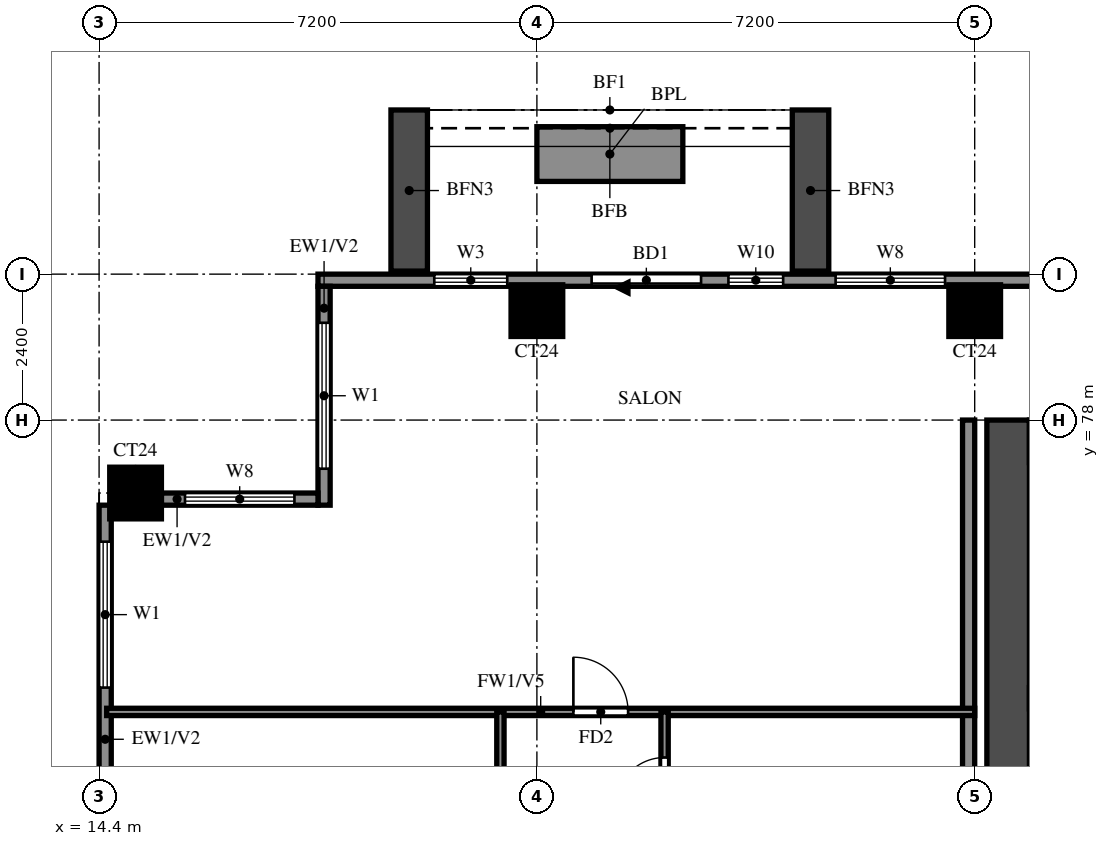
"""IFC4 building model, lengths in metres.
Left out: names, types, materials, properties, quantities, classifications, styles, units other than length and angle.
Written with IfcOpenShell. Run it as: python <this file> out.ifc"""

import sys

from ifc_helpers import new_model, si_unit, direction, frame, frame_2d, origin, origin_2d, place, context, subcontext, project, spatial, rectangle, extrude, source, transform, mapped, element, fill, save


model = new_model("IFC4")
c1 = context("Model", 3, precision=1e-05, world=origin(), true_north=direction((0.0, 1.0)))
c2 = subcontext(c1, "Body", "Model", "MODEL_VIEW")
j1 = project(units=[si_unit("LENGTHUNIT", "METRE"), si_unit("PLANEANGLEUNIT", "RADIAN")], contexts=[c1])
p1 = place(None, origin())
s1 = spatial("IfcSite", under=j1, at=p1, CompositionType="ELEMENT")
p2 = place(p1, origin())
s2 = spatial("IfcBuilding", under=s1, at=p2, CompositionType="ELEMENT")
p3 = place(p2, frame((0.0, 0.0, 153.5)))
s3 = spatial("IfcBuildingStorey", under=s2, at=p3, CompositionType="ELEMENT", Elevation=153.5)
m1 = source(origin(), c2, "Body", "SweptSolid", [
    extrude(rectangle(XDim=0.85, YDim=0.85, at=origin_2d()), origin(), (0.0, 0.0, 1.0), 3.2),
])
for number, where, z_axis, x_axis in (
    (1, (15.0, 76.8, 0.0), (0.0, 0.0, 1.0), (1.0, 0.0, 0.0)),
    (2, (21.6, 79.8, 0.0), (0.0, 0.0, 1.0), (1.0, 0.0, 0.0)),
    (3, (28.8, 79.8, 0.0), (0.0, 0.0, 1.0), (1.0, 0.0, 0.0)),
):
    element("IfcColumn", number, at=place(p3, frame(where, z_axis=z_axis, x_axis=x_axis)), inside=s3, PredefinedType="COLUMN", context=c2, shape_type="MappedRepresentation", body=[
        mapped(m1, transform((0.0, 0.0, 0.0))),
    ])
p4 = place(p3, frame((29.35, 66.1, 0.0), z_axis=(0.0, 0.0, 1.0), x_axis=(0.0, 1.0, 0.0)))
e4 = element("IfcWall", 4, at=p4, inside=s3, PredefinedType="SHEAR", context=c2, shape_type="SweptSolid", body=[
    extrude(rectangle(XDim=11.9, YDim=0.7, at=frame_2d((5.95, 0.0))), origin(), (0.0, 0.0, 1.0), 3.2),
])
p5 = place(p3, frame((82.6, 80.3, 0.0), z_axis=(0.0, 0.0, 1.0), x_axis=(-1.0, 0.0, 0.0)))
e5 = element("IfcWall", 5, at=p5, inside=s3, PredefinedType="SOLIDWALL", context=c2, shape_type="SweptSolid", body=[
    extrude(rectangle(XDim=64.6, YDim=0.2, at=frame_2d((32.3, 0.0))), origin(), (0.0, 0.0, 1.0), 3.2),
])
p6 = place(p5, frame((58.3, 0.0, 0.0)))
e6 = element("IfcOpeningElement", 6, at=p6, cuts=e5, PredefinedType="OPENING", context=c2, shape_type="SweptSolid", body=[
    extrude(rectangle(XDim=1.8, YDim=2.4, at=frame_2d((0.9, 1.2))), frame((0.0, 0.11, 0.0), z_axis=(0.0, -1.0, 0.0), x_axis=(1.0, 0.0, 0.0)), (0.0, 0.0, 1.0), 0.22),
])
p7 = place(p5, frame((54.288, 0.0, 0.6)))
e7 = element("IfcOpeningElement", 7, at=p7, cuts=e5, PredefinedType="OPENING", context=c2, shape_type="SweptSolid", body=[
    extrude(rectangle(XDim=1.8, YDim=2.4, at=frame_2d((0.9, 1.2))), frame((0.0, 0.11, 0.0), z_axis=(0.0, -1.0, 0.0), x_axis=(1.0, 0.0, 0.0)), (0.0, 0.0, 1.0), 0.22),
])
p8 = place(p5, frame((56.95, 0.0, 0.6)))
e8 = element("IfcOpeningElement", 8, at=p8, cuts=e5, PredefinedType="OPENING", context=c2, shape_type="SweptSolid", body=[
    extrude(rectangle(XDim=0.9, YDim=2.4, at=frame_2d((0.45, 1.2))), frame((0.0, 0.11, 0.0), z_axis=(0.0, -1.0, 0.0), x_axis=(1.0, 0.0, 0.0)), (0.0, 0.0, 1.0), 0.22),
])
p9 = place(p5, frame((61.488, 0.0, 0.6)))
e9 = element("IfcOpeningElement", 9, at=p9, cuts=e5, PredefinedType="OPENING", context=c2, shape_type="SweptSolid", body=[
    extrude(rectangle(XDim=1.2, YDim=2.4, at=frame_2d((0.6, 1.2))), frame((0.0, 0.11, 0.0), z_axis=(0.0, -1.0, 0.0), x_axis=(1.0, 0.0, 0.0)), (0.0, 0.0, 1.0), 0.22),
])
p10 = place(p5, frame((0.712, 0.0, 0.6)))
e10 = element("IfcOpeningElement", 10, at=p10, cuts=e5, PredefinedType="OPENING", context=c2, shape_type="SweptSolid", body=[
    extrude(rectangle(XDim=1.8, YDim=2.4, at=frame_2d((0.9, 1.2))), frame((0.0, 0.11, 0.0), z_axis=(0.0, -1.0, 0.0), x_axis=(1.0, 0.0, 0.0)), (0.0, 0.0, 1.0), 0.22),
])
p11 = place(p5, frame((4.358, 0.0, 0.6)))
e11 = element("IfcOpeningElement", 11, at=p11, cuts=e5, PredefinedType="OPENING", context=c2, shape_type="SweptSolid", body=[
    extrude(rectangle(XDim=2.4, YDim=2.4, at=frame_2d((1.2, 1.2))), frame((0.0, 0.11, 0.0), z_axis=(0.0, -1.0, 0.0), x_axis=(1.0, 0.0, 0.0)), (0.0, 0.0, 1.0), 0.22),
])
p12 = place(p5, frame((7.242, 0.0, 0.6)))
e12 = element("IfcOpeningElement", 12, at=p12, cuts=e5, PredefinedType="OPENING", context=c2, shape_type="SweptSolid", body=[
    extrude(rectangle(XDim=2.4, YDim=2.4, at=frame_2d((1.2, 1.2))), frame((0.0, 0.11, 0.0), z_axis=(0.0, -1.0, 0.0), x_axis=(1.0, 0.0, 0.0)), (0.0, 0.0, 1.0), 0.22),
])
p13 = place(p3, frame((18.1, 80.2, 0.0), z_axis=(0.0, 0.0, 1.0), x_axis=(0.0, -1.0, 0.0)))
e13 = element("IfcWall", 13, at=p13, inside=s3, PredefinedType="SOLIDWALL", context=c2, shape_type="SweptSolid", body=[
    extrude(rectangle(XDim=3.6, YDim=0.2, at=frame_2d((1.8, 0.0))), origin(), (0.0, 0.0, 1.0), 3.2),
])
p14 = place(p13, frame((0.6, 0.0, 0.6)))
e14 = element("IfcOpeningElement", 14, at=p14, cuts=e13, PredefinedType="OPENING", context=c2, shape_type="SweptSolid", body=[
    extrude(rectangle(XDim=2.4, YDim=2.4, at=frame_2d((1.2, 1.2))), frame((0.0, 0.11, 0.0), z_axis=(0.0, -1.0, 0.0), x_axis=(1.0, 0.0, 0.0)), (0.0, 0.0, 1.0), 0.22),
])
p15 = place(p3, frame((18.0, 76.7, 0.0), z_axis=(0.0, 0.0, 1.0), x_axis=(-1.0, 0.0, 0.0)))
e15 = element("IfcWall", 15, at=p15, inside=s3, PredefinedType="SOLIDWALL", context=c2, shape_type="SweptSolid", body=[
    extrude(rectangle(XDim=2.575, YDim=0.2, at=frame_2d((1.288, 0.0))), origin(), (0.0, 0.0, 1.0), 3.2),
])
p16 = place(p15, frame((0.387, 0.0, 0.6)))
e16 = element("IfcOpeningElement", 16, at=p16, cuts=e15, PredefinedType="OPENING", context=c2, shape_type="SweptSolid", body=[
    extrude(rectangle(XDim=1.8, YDim=2.4, at=frame_2d((0.9, 1.2))), frame((0.0, 0.11, 0.0), z_axis=(0.0, -1.0, 0.0), x_axis=(1.0, 0.0, 0.0)), (0.0, 0.0, 1.0), 0.22),
])
p17 = place(p3, frame((14.5, 76.6, 0.0), z_axis=(0.0, 0.0, 1.0), x_axis=(0.0, -1.0, 0.0)))
e17 = element("IfcWall", 17, at=p17, inside=s3, PredefinedType="SOLIDWALL", context=c2, shape_type="SweptSolid", body=[
    extrude(rectangle(XDim=7.0, YDim=0.2, at=frame_2d((3.5, 0.0))), origin(), (0.0, 0.0, 1.0), 3.2),
])
p18 = place(p17, frame((4.562, 0.0, 1.5)))
e18 = element("IfcOpeningElement", 18, at=p18, cuts=e17, PredefinedType="OPENING", context=c2, shape_type="SweptSolid", body=[
    extrude(rectangle(XDim=0.9, YDim=0.9, at=frame_2d((0.45, 0.45))), frame((0.0, 0.11, 0.0), z_axis=(0.0, -1.0, 0.0), x_axis=(1.0, 0.0, 0.0)), (0.0, 0.0, 1.0), 0.22),
])
p19 = place(p17, frame((0.6, 0.0, 0.6)))
e19 = element("IfcOpeningElement", 19, at=p19, cuts=e17, PredefinedType="OPENING", context=c2, shape_type="SweptSolid", body=[
    extrude(rectangle(XDim=2.4, YDim=2.4, at=frame_2d((1.2, 1.2))), frame((0.0, 0.11, 0.0), z_axis=(0.0, -1.0, 0.0), x_axis=(1.0, 0.0, 0.0)), (0.0, 0.0, 1.0), 0.22),
])
for number, where, z_axis, x_axis in (
    (20, (26.1, 80.45, 0.0), (0.0, 0.0, 1.0), (0.0, 1.0, 0.0)),
    (21, (19.5, 80.45, 0.0), (0.0, 0.0, 1.0), (0.0, 1.0, 0.0)),
):
    element("IfcWall", number, at=place(p3, frame(where, z_axis=z_axis, x_axis=x_axis)), inside=s3, PredefinedType="SOLIDWALL", context=c2, shape_type="SweptSolid", body=[
        extrude(rectangle(XDim=2.65, YDim=0.6, at=frame_2d((1.325, 0.0))), origin(), (0.0, 0.0, 1.0), 2.85),
    ])
p20 = place(p3, frame((24.0, 82.375, 0.0), z_axis=(0.0, 0.0, 1.0), x_axis=(-1.0, 0.0, 0.0)))
e22 = element("IfcWall", 22, at=p20, inside=s3, PredefinedType="SOLIDWALL", context=c2, shape_type="SweptSolid", body=[
    extrude(rectangle(XDim=2.4, YDim=0.9, at=frame_2d((1.2, 0.0))), origin(), (0.0, 0.0, 1.0), 0.9),
])
p21 = place(p3, frame((28.7, 62.4, 0.0), z_axis=(0.0, 0.0, 1.0), x_axis=(0.0, 1.0, 0.0)))
e23 = element("IfcWall", 23, at=p21, inside=s3, PredefinedType="SOLIDWALL", context=c2, shape_type="SweptSolid", body=[
    extrude(rectangle(XDim=15.6, YDim=0.2, at=frame_2d((7.8, 0.0))), origin(), (0.0, 0.0, 1.0), 3.2),
])
p22 = place(p3, frame((14.525, 73.2, 0.0), z_axis=(0.0, 0.0, 1.0), x_axis=(1.0, 0.0, 0.0)))
e24 = element("IfcWall", 24, at=p22, inside=s3, PredefinedType="PARTITIONING", context=c2, shape_type="SweptSolid", body=[
    extrude(rectangle(XDim=14.275, YDim=0.12, at=frame_2d((7.138, 0.0))), origin(), (0.0, 0.0, 1.0), 2.3),
])
p23 = place(p22, frame((7.675, 0.0, 0.0)))
e25 = element("IfcOpeningElement", 25, at=p23, cuts=e24, PredefinedType="OPENING", context=c2, shape_type="SweptSolid", body=[
    extrude(rectangle(XDim=0.9, YDim=2.1, at=frame_2d((0.45, 1.05))), frame((0.0, 0.07, 0.0), z_axis=(0.0, -1.0, 0.0), x_axis=(1.0, 0.0, 0.0)), (0.0, 0.0, 1.0), 0.14),
])
p24 = place(p3, frame((21.0, 69.6, 0.0), z_axis=(0.0, 0.0, 1.0), x_axis=(0.0, 1.0, 0.0)))
e26 = element("IfcWall", 26, at=p24, inside=s3, PredefinedType="PARTITIONING", context=c2, shape_type="SweptSolid", body=[
    extrude(rectangle(XDim=3.6, YDim=0.12, at=frame_2d((1.8, 0.0))), origin(), (0.0, 0.0, 1.0), 3.2),
])
p25 = place(p3, frame((23.7, 61.2, 0.0), z_axis=(0.0, 0.0, 1.0), x_axis=(0.0, 1.0, 0.0)))
e27 = element("IfcWall", 27, at=p25, inside=s3, PredefinedType="PARTITIONING", context=c2, shape_type="SweptSolid", body=[
    extrude(rectangle(XDim=12.0, YDim=0.12, at=frame_2d((6.0, 0.0))), origin(), (0.0, 0.0, 1.0), 3.2),
])
p26 = place(p25, frame((4.2, 0.0, 0.0)))
e28 = element("IfcOpeningElement", 28, at=p26, cuts=e27, PredefinedType="OPENING", context=c2, shape_type="SweptSolid", body=[
    extrude(rectangle(XDim=0.9, YDim=2.1, at=frame_2d((0.45, 1.05))), frame((0.0, 0.07, 0.0), z_axis=(0.0, -1.0, 0.0), x_axis=(1.0, 0.0, 0.0)), (0.0, 0.0, 1.0), 0.14),
])
p27 = place(p25, frame((7.975, 0.0, 0.0)))
e29 = element("IfcOpeningElement", 29, at=p27, cuts=e27, PredefinedType="OPENING", context=c2, shape_type="SweptSolid", body=[
    extrude(rectangle(XDim=0.8, YDim=2.1, at=frame_2d((0.4, 1.05))), frame((0.0, 0.07, 0.0), z_axis=(0.0, -1.0, 0.0), x_axis=(1.0, 0.0, 0.0)), (0.0, 0.0, 1.0), 0.14),
])
p28 = place(p25, frame((10.45, 0.0, 0.0)))
e30 = element("IfcOpeningElement", 30, at=p28, cuts=e27, PredefinedType="OPENING", context=c2, shape_type="SweptSolid", body=[
    extrude(rectangle(XDim=0.8, YDim=2.1, at=frame_2d((0.4, 1.05))), frame((0.0, 0.07, 0.0), z_axis=(0.0, -1.0, 0.0), x_axis=(1.0, 0.0, 0.0)), (0.0, 0.0, 1.0), 0.14),
])
p29 = place(p6, origin())
e31 = element("IfcDoor", 31, at=p29, inside=s3, OperationType="DOUBLE_DOOR_SLIDING", PredefinedType="DOOR", context=c2, shape_type="SweptSolid", body=[
    extrude(rectangle(XDim=1.8, YDim=2.4, at=frame_2d((0.9, 1.2))), frame((0.0, 0.025, 0.0), z_axis=(0.0, -1.0, 0.0), x_axis=(1.0, 0.0, 0.0)), (0.0, 0.0, 1.0), 0.05),
])
fill(e6, e31)
p30 = place(p7, origin())
e32 = element("IfcWindow", 32, at=p30, inside=s3, PartitioningType="DOUBLE_PANEL_VERTICAL", PredefinedType="WINDOW", context=c2, shape_type="SweptSolid", body=[
    extrude(rectangle(XDim=1.8, YDim=2.4, at=frame_2d((0.9, 1.2))), frame((0.0, 0.03, 0.0), z_axis=(0.0, -1.0, 0.0), x_axis=(1.0, 0.0, 0.0)), (0.0, 0.0, 1.0), 0.06),
])
fill(e7, e32)
p31 = place(p8, origin())
e33 = element("IfcWindow", 33, at=p31, inside=s3, PartitioningType="SINGLE_PANEL", PredefinedType="WINDOW", context=c2, shape_type="SweptSolid", body=[
    extrude(rectangle(XDim=0.9, YDim=2.4, at=frame_2d((0.45, 1.2))), frame((0.0, 0.03, 0.0), z_axis=(0.0, -1.0, 0.0), x_axis=(1.0, 0.0, 0.0)), (0.0, 0.0, 1.0), 0.06),
])
fill(e8, e33)
p32 = place(p9, origin())
e34 = element("IfcWindow", 34, at=p32, inside=s3, PartitioningType="SINGLE_PANEL", PredefinedType="WINDOW", context=c2, shape_type="SweptSolid", body=[
    extrude(rectangle(XDim=1.2, YDim=2.4, at=frame_2d((0.6, 1.2))), frame((0.0, 0.03, 0.0), z_axis=(0.0, -1.0, 0.0), x_axis=(1.0, 0.0, 0.0)), (0.0, 0.0, 1.0), 0.06),
])
fill(e9, e34)
p33 = place(p14, origin())
e35 = element("IfcWindow", 35, at=p33, inside=s3, PartitioningType="DOUBLE_PANEL_VERTICAL", PredefinedType="WINDOW", context=c2, shape_type="SweptSolid", body=[
    extrude(rectangle(XDim=2.4, YDim=2.4, at=frame_2d((1.2, 1.2))), frame((0.0, 0.03, 0.0), z_axis=(0.0, -1.0, 0.0), x_axis=(1.0, 0.0, 0.0)), (0.0, 0.0, 1.0), 0.06),
])
fill(e14, e35)
p34 = place(p16, origin())
e36 = element("IfcWindow", 36, at=p34, inside=s3, PartitioningType="DOUBLE_PANEL_VERTICAL", PredefinedType="WINDOW", context=c2, shape_type="SweptSolid", body=[
    extrude(rectangle(XDim=1.8, YDim=2.4, at=frame_2d((0.9, 1.2))), frame((0.0, 0.03, 0.0), z_axis=(0.0, -1.0, 0.0), x_axis=(1.0, 0.0, 0.0)), (0.0, 0.0, 1.0), 0.06),
])
fill(e16, e36)
p35 = place(p19, origin())
e37 = element("IfcWindow", 37, at=p35, inside=s3, PartitioningType="DOUBLE_PANEL_VERTICAL", PredefinedType="WINDOW", context=c2, shape_type="SweptSolid", body=[
    extrude(rectangle(XDim=2.4, YDim=2.4, at=frame_2d((1.2, 1.2))), frame((0.0, 0.03, 0.0), z_axis=(0.0, -1.0, 0.0), x_axis=(1.0, 0.0, 0.0)), (0.0, 0.0, 1.0), 0.06),
])
fill(e19, e37)
p36 = place(p23, origin())
e38 = element("IfcDoor", 38, at=p36, inside=s3, OperationType="SINGLE_SWING_LEFT", PredefinedType="DOOR", context=c2, shape_type="SweptSolid", body=[
    extrude(rectangle(XDim=0.9, YDim=2.1, at=frame_2d((0.45, 1.05))), frame((0.0, 0.025, 0.0), z_axis=(0.0, -1.0, 0.0), x_axis=(1.0, 0.0, 0.0)), (0.0, 0.0, 1.0), 0.05),
])
fill(e25, e38)
p37 = place(p28, origin())
e39 = element("IfcDoor", 39, at=p37, inside=s3, OperationType="SINGLE_SWING_RIGHT", PredefinedType="DOOR", context=c2, shape_type="SweptSolid", body=[
    extrude(rectangle(XDim=0.8, YDim=2.1, at=frame_2d((0.4, 1.05))), frame((0.0, 0.025, 0.0), z_axis=(0.0, -1.0, 0.0), x_axis=(1.0, 0.0, 0.0)), (0.0, 0.0, 1.0), 0.05),
])
fill(e30, e39)
save(model, sys.argv[1])
